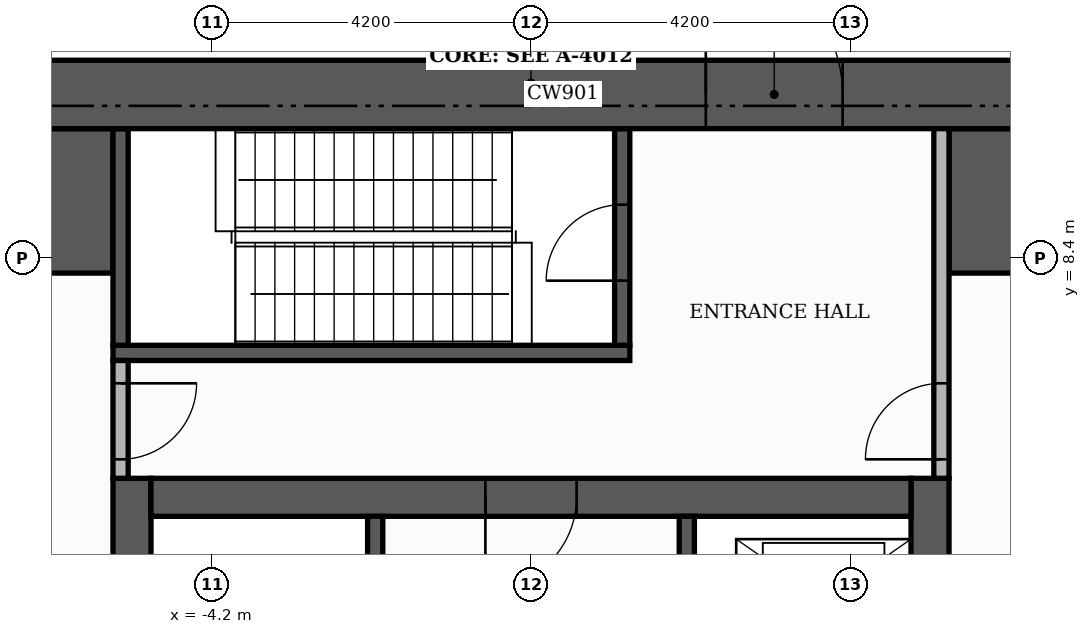
"""IFC4 building model, lengths in metres.
Left out: names, types, materials, properties, quantities, classifications, styles, units other than length and angle.
Written with IfcOpenShell. Run it as: python <this file> out.ifc"""

import sys

from ifc_helpers import new_model, si_unit, direction, frame, frame_2d, origin, place, context, subcontext, project, spatial, rectangle, extrude, element, fill, save


model = new_model("IFC4")
c1 = context("Model", 3, precision=1e-05, world=origin(), true_north=direction((0.0, 1.0)))
c2 = subcontext(c1, "Body", "Model", "MODEL_VIEW")
j1 = project(units=[si_unit("LENGTHUNIT", "METRE"), si_unit("PLANEANGLEUNIT", "RADIAN")], contexts=[c1])
p1 = place(None, origin())
s1 = spatial("IfcSite", under=j1, at=p1, CompositionType="ELEMENT")
p2 = place(p1, origin())
s2 = spatial("IfcBuilding", under=s1, at=p2, CompositionType="ELEMENT")
p3 = place(p2, frame((0.0, 0.0, 73.8)))
s3 = spatial("IfcBuildingStorey", under=s2, at=p3, CompositionType="ELEMENT", Elevation=73.8)
for number, where, z_axis, x_axis in (
    (1, (-5.25, -5.0, 0.0), (0.0, 0.0, 1.0), (0.0, 1.0, 0.0)),
    (2, (5.25, -5.0, 0.0), (0.0, 0.0, 1.0), (0.0, 1.0, 0.0)),
):
    element("IfcWall", number, at=place(p3, frame(where, z_axis=z_axis, x_axis=x_axis)), inside=s3, PredefinedType="SHEAR", context=c2, shape_type="SweptSolid", body=[
        extrude(rectangle(XDim=10.5, YDim=0.5, at=frame_2d((5.25, 0.0))), origin(), (0.0, 0.0, 1.0), 4.98),
    ])
p4 = place(p3, frame((-5.0, 5.25, 0.0), z_axis=(0.0, 0.0, 1.0), x_axis=(1.0, 0.0, 0.0)))
e3 = element("IfcWall", 3, at=p4, inside=s3, PredefinedType="SHEAR", context=c2, shape_type="SweptSolid", body=[
    extrude(rectangle(XDim=10.0, YDim=0.5, at=frame_2d((5.0, 0.0))), origin(), (0.0, 0.0, 1.0), 4.98),
])
p5 = place(p4, frame((4.4, 0.0, 0.0)))
e4 = element("IfcOpeningElement", 4, at=p5, cuts=e3, PredefinedType="OPENING", context=c2, shape_type="SweptSolid", body=[
    extrude(rectangle(XDim=1.2, YDim=2.1, at=frame_2d((0.6, 1.05))), frame((0.0, 0.26, 0.0), z_axis=(0.0, -1.0, 0.0), x_axis=(1.0, 0.0, 0.0)), (0.0, 0.0, 1.0), 0.52),
])
for number, where, z_axis, x_axis in (
    (5, (-10.1, 9.15, 0.0), (0.0, 0.0, 1.0), (1.0, 0.0, 0.0)),
    (6, (5.5, 9.15, 0.0), (0.0, 0.0, 1.0), (1.0, 0.0, 0.0)),
):
    element("IfcWall", number, at=place(p3, frame(where, z_axis=z_axis, x_axis=x_axis)), inside=s3, PredefinedType="SHEAR", context=c2, shape_type="SweptSolid", body=[
        extrude(rectangle(XDim=4.6, YDim=1.9, at=frame_2d((2.3, 0.0))), origin(), (0.0, 0.0, 1.0), 4.98),
    ])
p6 = place(p3, frame((-2.05, -1.4, 0.0), z_axis=(0.0, 0.0, 1.0), x_axis=(0.0, 1.0, 0.0)))
e7 = element("IfcWall", 7, at=p6, inside=s3, PredefinedType="SHEAR", context=c2, shape_type="SweptSolid", body=[
    extrude(rectangle(XDim=6.4, YDim=0.2, at=frame_2d((3.2, 0.0))), origin(), (0.0, 0.0, 1.0), 4.98),
])
p7 = place(p6, frame((0.15, 0.0, 0.0)))
e8 = element("IfcOpeningElement", 8, at=p7, cuts=e7, PredefinedType="OPENING", context=c2, shape_type="SweptSolid", body=[
    extrude(rectangle(XDim=1.0, YDim=2.1, at=frame_2d((0.5, 1.05))), frame((0.0, 0.11, 0.0), z_axis=(0.0, -1.0, 0.0), x_axis=(1.0, 0.0, 0.0)), (0.0, 0.0, 1.0), 0.22),
])
p8 = place(p3, frame((-5.5, 7.15, 0.0), z_axis=(0.0, 0.0, 1.0), x_axis=(1.0, 0.0, 0.0)))
e9 = element("IfcWall", 9, at=p8, inside=s3, PredefinedType="SHEAR", context=c2, shape_type="SweptSolid", body=[
    extrude(rectangle(XDim=6.8, YDim=0.2, at=frame_2d((3.4, 0.0))), origin(), (0.0, 0.0, 1.0), 4.98),
])
p9 = place(p3, frame((-5.4, 7.25, 0.0), z_axis=(0.0, 0.0, 1.0), x_axis=(0.0, 1.0, 0.0)))
e10 = element("IfcWall", 10, at=p9, inside=s3, PredefinedType="SHEAR", context=c2, shape_type="SweptSolid", body=[
    extrude(rectangle(XDim=2.85, YDim=0.2, at=frame_2d((1.425, 0.0))), origin(), (0.0, 0.0, 1.0), 4.98),
])
p10 = place(p3, frame((1.2, 7.25, 0.0), z_axis=(0.0, 0.0, 1.0), x_axis=(0.0, 1.0, 0.0)))
e11 = element("IfcWall", 11, at=p10, inside=s3, PredefinedType="SHEAR", context=c2, shape_type="SweptSolid", body=[
    extrude(rectangle(XDim=2.85, YDim=0.2, at=frame_2d((1.425, 0.0))), origin(), (0.0, 0.0, 1.0), 4.98),
])
p11 = place(p10, frame((0.85, 0.0, 0.0)))
e12 = element("IfcOpeningElement", 12, at=p11, cuts=e11, PredefinedType="OPENING", context=c2, shape_type="SweptSolid", body=[
    extrude(rectangle(XDim=1.0, YDim=2.1, at=frame_2d((0.5, 1.05))), frame((0.0, 0.11, 0.0), z_axis=(0.0, -1.0, 0.0), x_axis=(1.0, 0.0, 0.0)), (0.0, 0.0, 1.0), 0.22),
])
p12 = place(p3, frame((2.05, 1.6, 0.0), z_axis=(0.0, 0.0, 1.0), x_axis=(0.0, 1.0, 0.0)))
e13 = element("IfcWall", 13, at=p12, inside=s3, PredefinedType="SHEAR", context=c2, shape_type="SweptSolid", body=[
    extrude(rectangle(XDim=3.4, YDim=0.2, at=frame_2d((1.7, 0.0))), origin(), (0.0, 0.0, 1.0), 4.98),
])
p13 = place(p12, frame((1.75, 0.0, 0.0)))
e14 = element("IfcOpeningElement", 14, at=p13, cuts=e13, PredefinedType="OPENING", context=c2, shape_type="SweptSolid", body=[
    extrude(rectangle(XDim=1.1, YDim=2.1, at=frame_2d((0.55, 1.05))), frame((0.0, 0.11, 0.0), z_axis=(0.0, -1.0, 0.0), x_axis=(1.0, 0.0, 0.0)), (0.0, 0.0, 1.0), 0.22),
])
p14 = place(p12, frame((0.15, 0.0, 0.0)))
e15 = element("IfcOpeningElement", 15, at=p14, cuts=e13, PredefinedType="OPENING", context=c2, shape_type="SweptSolid", body=[
    extrude(rectangle(XDim=0.8, YDim=2.1, at=frame_2d((0.4, 1.05))), frame((0.0, 0.11, 0.0), z_axis=(0.0, -1.0, 0.0), x_axis=(1.0, 0.0, 0.0)), (0.0, 0.0, 1.0), 0.22),
])
p15 = place(p3, frame((-11.0, 10.55, 0.0), z_axis=(0.0, 0.0, 1.0), x_axis=(1.0, 0.0, 0.0)))
e16 = element("IfcWall", 16, at=p15, inside=s3, PredefinedType="SHEAR", context=c2, shape_type="SweptSolid", body=[
    extrude(rectangle(XDim=22.0, YDim=0.9, at=frame_2d((11.0, 0.0))), origin(), (0.0, 0.0, 1.0), 4.98),
])
p16 = place(p15, frame((13.3, 0.0, 0.0)))
e17 = element("IfcOpeningElement", 17, at=p16, cuts=e16, PredefinedType="OPENING", context=c2, shape_type="SweptSolid", body=[
    extrude(rectangle(XDim=1.8, YDim=2.2, at=frame_2d((0.9, 1.1))), frame((0.0, 0.46, 0.0), z_axis=(0.0, -1.0, 0.0), x_axis=(1.0, 0.0, 0.0)), (0.0, 0.0, 1.0), 0.92),
])
p17 = place(p3, frame((-5.4, 5.5, 0.0), z_axis=(0.0, 0.0, 1.0), x_axis=(0.0, 1.0, 0.0)))
e18 = element("IfcWall", 18, at=p17, inside=s3, PredefinedType="PARTITIONING", context=c2, shape_type="SweptSolid", body=[
    extrude(rectangle(XDim=1.55, YDim=0.2, at=frame_2d((0.775, 0.0))), origin(), (0.0, 0.0, 1.0), 4.98),
])
p18 = place(p17, frame((0.25, 0.0, 0.0)))
e19 = element("IfcOpeningElement", 19, at=p18, cuts=e18, PredefinedType="OPENING", context=c2, shape_type="SweptSolid", body=[
    extrude(rectangle(XDim=1.0, YDim=2.1, at=frame_2d((0.5, 1.05))), frame((0.0, 0.11, 0.0), z_axis=(0.0, -1.0, 0.0), x_axis=(1.0, 0.0, 0.0)), (0.0, 0.0, 1.0), 0.22),
])
p19 = place(p3, frame((5.4, 5.5, 0.0), z_axis=(0.0, 0.0, 1.0), x_axis=(0.0, 1.0, 0.0)))
e20 = element("IfcWall", 20, at=p19, inside=s3, PredefinedType="PARTITIONING", context=c2, shape_type="SweptSolid", body=[
    extrude(rectangle(XDim=4.6, YDim=0.2, at=frame_2d((2.3, 0.0))), origin(), (0.0, 0.0, 1.0), 4.98),
])
p20 = place(p19, frame((0.25, 0.0, 0.0)))
e21 = element("IfcOpeningElement", 21, at=p20, cuts=e20, PredefinedType="OPENING", context=c2, shape_type="SweptSolid", body=[
    extrude(rectangle(XDim=1.0, YDim=2.1, at=frame_2d((0.5, 1.05))), frame((0.0, 0.11, 0.0), z_axis=(0.0, -1.0, 0.0), x_axis=(1.0, 0.0, 0.0)), (0.0, 0.0, 1.0), 0.22),
])
p21 = place(p5, frame((1.2, 0.0, 0.0), z_axis=(0.0, 0.0, 1.0), x_axis=(-1.0, 0.0, 0.0)))
e22 = element("IfcDoor", 22, at=p21, inside=s3, OperationType="SINGLE_SWING_LEFT", PredefinedType="DOOR", context=c2, shape_type="SweptSolid", body=[
    extrude(rectangle(XDim=1.2, YDim=2.1, at=frame_2d((0.6, 1.05))), frame((0.0, 0.025, 0.0), z_axis=(0.0, -1.0, 0.0), x_axis=(1.0, 0.0, 0.0)), (0.0, 0.0, 1.0), 0.05),
])
fill(e4, e22)
p22 = place(p11, origin())
e23 = element("IfcDoor", 23, at=p22, inside=s3, OperationType="SINGLE_SWING_LEFT", PredefinedType="DOOR", context=c2, shape_type="SweptSolid", body=[
    extrude(rectangle(XDim=1.0, YDim=2.1, at=frame_2d((0.5, 1.05))), frame((0.0, 0.025, 0.0), z_axis=(0.0, -1.0, 0.0), x_axis=(1.0, 0.0, 0.0)), (0.0, 0.0, 1.0), 0.05),
])
fill(e12, e23)
p23 = place(p18, frame((1.0, 0.0, 0.0), z_axis=(0.0, 0.0, 1.0), x_axis=(-1.0, 0.0, 0.0)))
e24 = element("IfcDoor", 24, at=p23, inside=s3, OperationType="SINGLE_SWING_RIGHT", PredefinedType="DOOR", context=c2, shape_type="SweptSolid", body=[
    extrude(rectangle(XDim=1.0, YDim=2.1, at=frame_2d((0.5, 1.05))), frame((0.0, 0.025, 0.0), z_axis=(0.0, -1.0, 0.0), x_axis=(1.0, 0.0, 0.0)), (0.0, 0.0, 1.0), 0.05),
])
fill(e19, e24)
p24 = place(p20, origin())
e25 = element("IfcDoor", 25, at=p24, inside=s3, OperationType="SINGLE_SWING_LEFT", PredefinedType="DOOR", context=c2, shape_type="SweptSolid", body=[
    extrude(rectangle(XDim=1.0, YDim=2.1, at=frame_2d((0.5, 1.05))), frame((0.0, 0.025, 0.0), z_axis=(0.0, -1.0, 0.0), x_axis=(1.0, 0.0, 0.0)), (0.0, 0.0, 1.0), 0.05),
])
fill(e21, e25)
p25 = place(p16, origin())
e26 = element("IfcDoor", 26, at=p25, inside=s3, OperationType="DOUBLE_DOOR_SINGLE_SWING", PredefinedType="DOOR", context=c2, shape_type="SweptSolid", body=[
    extrude(rectangle(XDim=1.8, YDim=2.2, at=frame_2d((0.9, 1.1))), frame((0.0, 0.025, 0.0), z_axis=(0.0, -1.0, 0.0), x_axis=(1.0, 0.0, 0.0)), (0.0, 0.0, 1.0), 0.05),
])
fill(e17, e26)
save(model, sys.argv[1])
